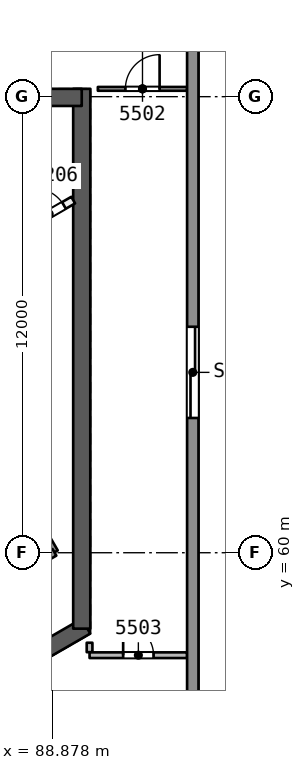
"""IFC4 building model, lengths in metres.
Left out: names, types, materials, properties, quantities, classifications, styles, units other than length and angle.
Written with IfcOpenShell. Run it as: python <this file> out.ifc"""

import sys

from ifc_helpers import new_model, si_unit, direction, frame, frame_2d, origin, place, context, subcontext, project, spatial, rectangle, extrude, element, fill, save


model = new_model("IFC4")
c1 = context("Model", 3, precision=1e-05, world=origin(), true_north=direction((0.0, 1.0)))
c2 = subcontext(c1, "Body", "Model", "MODEL_VIEW")
j1 = project(units=[si_unit("LENGTHUNIT", "METRE"), si_unit("PLANEANGLEUNIT", "RADIAN")], contexts=[c1])
p1 = place(None, origin())
s1 = spatial("IfcSite", under=j1, at=p1, CompositionType="ELEMENT")
p2 = place(p1, origin())
s2 = spatial("IfcBuilding", under=s1, at=p2, CompositionType="ELEMENT")
p3 = place(p2, frame((0.0, 0.0, 224.3)))
s3 = spatial("IfcBuildingStorey", under=s2, at=p3, CompositionType="ELEMENT", Elevation=224.3)
p4 = place(p3, frame((86.723, 56.31, 0.0), z_axis=(0.0, 0.0, 1.0), x_axis=(0.866042179588, 0.49997094233, 0.0)))
e1 = element("IfcWall", 1, at=p4, inside=s3, PredefinedType="SHEAR", context=c2, shape_type="SweptSolid", body=[
    extrude(rectangle(XDim=3.515, YDim=0.45, at=frame_2d((1.758, 0.0))), origin(), (0.0, 0.0, 1.0), 3.7),
])
p5 = place(p3, frame((89.655, 58.002, 0.0), z_axis=(0.0, 0.0, 1.0), x_axis=(0.0, 1.0, 0.0)))
e2 = element("IfcWall", 2, at=p5, inside=s3, PredefinedType="SHEAR", context=c2, shape_type="SweptSolid", body=[
    extrude(rectangle(XDim=14.204, YDim=0.45, at=frame_2d((7.102, 0.0))), origin(), (0.0, 0.0, 1.0), 3.7),
])
p6 = place(p3, frame((89.655, 71.981, 0.0), z_axis=(0.0, 0.0, 1.0), x_axis=(-1.0, 0.0, 0.0)))
e3 = element("IfcWall", 3, at=p6, inside=s3, PredefinedType="SHEAR", context=c2, shape_type="SweptSolid", body=[
    extrude(rectangle(XDim=10.155, YDim=0.45, at=frame_2d((5.078, 0.0))), origin(), (0.0, 0.0, 1.0), 3.7),
])
p7 = place(p6, frame((8.005, 0.0, 0.0)))
e4 = element("IfcOpeningElement", 4, at=p7, cuts=e3, PredefinedType="OPENING", context=c2, shape_type="SweptSolid", body=[
    extrude(rectangle(XDim=1.2, YDim=2.1, at=frame_2d((0.6, 1.05))), frame((0.0, 0.235, 0.0), z_axis=(0.0, -1.0, 0.0), x_axis=(1.0, 0.0, 0.0)), (0.0, 0.0, 1.0), 0.471),
])
p8 = place(p3, frame((90.079, 72.206, 0.0), z_axis=(0.0, 0.0, 1.0), x_axis=(1.0, 0.0, 0.0)))
e5 = element("IfcWall", 5, at=p8, inside=s3, PredefinedType="PARTITIONING", context=c2, shape_type="SweptSolid", body=[
    extrude(rectangle(XDim=2.349, YDim=0.1, at=frame_2d((1.175, 0.0))), origin(), (0.0, 0.0, 1.0), 3.3),
])
p9 = place(p8, frame((0.725, 0.0, 0.0)))
e6 = element("IfcOpeningElement", 6, at=p9, cuts=e5, PredefinedType="OPENING", context=c2, shape_type="SweptSolid", body=[
    extrude(rectangle(XDim=0.9, YDim=2.1, at=frame_2d((0.45, 1.05))), frame((0.0, 0.061, 0.0), z_axis=(0.0, -1.0, 0.0), x_axis=(1.0, 0.0, 0.0)), (0.0, 0.0, 1.0), 0.121),
])
p10 = place(p3, frame((89.861, 57.632, 0.0), z_axis=(0.0, 0.0, 1.0), x_axis=(0.0, -1.0, 0.0)))
e7 = element("IfcWall", 7, at=p10, inside=s3, PredefinedType="PARTITIONING", context=c2, shape_type="SweptSolid", body=[
    extrude(rectangle(XDim=0.248, YDim=0.15, at=frame_2d((0.124, 0.0))), origin(), (0.0, 0.0, 1.0), 3.3),
])
p11 = place(p3, frame((89.861, 57.304, 0.0), z_axis=(0.0, 0.0, 1.0), x_axis=(1.0, 0.0, 0.0)))
e8 = element("IfcWall", 8, at=p11, inside=s3, PredefinedType="PARTITIONING", context=c2, shape_type="SweptSolid", body=[
    extrude(rectangle(XDim=2.567, YDim=0.15, at=frame_2d((1.284, 0.0))), origin(), (0.0, 0.0, 1.0), 3.3),
])
p12 = place(p11, frame((0.884, 0.0, 0.0)))
e9 = element("IfcOpeningElement", 9, at=p12, cuts=e8, PredefinedType="OPENING", context=c2, shape_type="SweptSolid", body=[
    extrude(rectangle(XDim=0.8, YDim=2.1, at=frame_2d((0.4, 1.05))), frame((0.0, 0.085, 0.0), z_axis=(0.0, -1.0, 0.0), x_axis=(1.0, 0.0, 0.0)), (0.0, 0.0, 1.0), 0.171),
])
p13 = place(p3, frame((88.402, 56.789, 0.0), z_axis=(0.0, 0.0, 1.0), x_axis=(0.499966389646, -0.866044807862, 0.0)))
e10 = element("IfcWall", 10, at=p13, inside=s3, PredefinedType="PARTITIONING", context=c2, shape_type="SweptSolid", body=[
    extrude(rectangle(XDim=3.725, YDim=0.15, at=frame_2d((1.863, 0.0))), origin(), (0.0, 0.0, 1.0), 3.3),
])
p14 = place(p3, frame((92.577, 105.274, 0.0), z_axis=(0.0, 0.0, 1.0), x_axis=(0.0, -1.0, 0.0)))
e11 = element("IfcWall", 11, at=p14, inside=s3, PredefinedType="SOLIDWALL", context=c2, shape_type="SweptSolid", body=[
    extrude(rectangle(XDim=50.547, YDim=0.3, at=frame_2d((25.274, 0.0))), origin(), (0.0, 0.0, 1.0), 3.3),
])
p15 = place(p14, frame((29.218, 0.0, 0.0)))
e12 = element("IfcOpeningElement", 12, at=p15, cuts=e11, PredefinedType="OPENING", context=c2, shape_type="SweptSolid", body=[
    extrude(rectangle(XDim=2.4, YDim=2.4, at=frame_2d((1.2, 1.2))), frame((0.0, 0.161, 0.0), z_axis=(0.0, -1.0, 0.0), x_axis=(1.0, 0.0, 0.0)), (0.0, 0.0, 1.0), 0.321),
])
p16 = place(p14, frame((39.328, 0.0, 0.0)))
e13 = element("IfcOpeningElement", 13, at=p16, cuts=e11, PredefinedType="OPENING", context=c2, shape_type="SweptSolid", body=[
    extrude(rectangle(XDim=2.4, YDim=2.4, at=frame_2d((1.2, 1.2))), frame((0.0, 0.161, 0.0), z_axis=(0.0, -1.0, 0.0), x_axis=(1.0, 0.0, 0.0)), (0.0, 0.0, 1.0), 0.321),
])
p17 = place(p14, frame((18.774, 0.0, 0.0)))
e14 = element("IfcOpeningElement", 14, at=p17, cuts=e11, PredefinedType="OPENING", context=c2, shape_type="SweptSolid", body=[
    extrude(rectangle(XDim=2.4, YDim=2.4, at=frame_2d((1.2, 1.2))), frame((0.0, 0.161, 0.0), z_axis=(0.0, -1.0, 0.0), x_axis=(1.0, 0.0, 0.0)), (0.0, 0.0, 1.0), 0.321),
])
p18 = place(p14, frame((8.771, 0.0, 0.0)))
e15 = element("IfcOpeningElement", 15, at=p18, cuts=e11, PredefinedType="OPENING", context=c2, shape_type="SweptSolid", body=[
    extrude(rectangle(XDim=2.4, YDim=2.4, at=frame_2d((1.2, 1.2))), frame((0.0, 0.161, 0.0), z_axis=(0.0, -1.0, 0.0), x_axis=(1.0, 0.0, 0.0)), (0.0, 0.0, 1.0), 0.321),
])
p19 = place(p14, frame((23.918, 0.0, 0.0)))
e16 = element("IfcOpeningElement", 16, at=p19, cuts=e11, PredefinedType="OPENING", context=c2, shape_type="SweptSolid", body=[
    extrude(rectangle(XDim=2.4, YDim=2.4, at=frame_2d((1.2, 1.2))), frame((0.0, 0.161, 0.0), z_axis=(0.0, -1.0, 0.0), x_axis=(1.0, 0.0, 0.0)), (0.0, 0.0, 1.0), 0.321),
])
p20 = place(p3, frame((85.087, 66.679, 0.0), z_axis=(0.0, 0.0, 1.0), x_axis=(0.500019787375, -0.866013979237, 0.0)))
e17 = element("IfcWall", 17, at=p20, inside=s3, PredefinedType="SOLIDWALL", context=c2, shape_type="SweptSolid", body=[
    extrude(rectangle(XDim=7.7, YDim=0.2, at=frame_2d((3.85, 0.0))), origin(), (0.0, 0.0, 1.0), 3.3),
])
p21 = place(p20, frame((0.55, 0.0, 0.0)))
e18 = element("IfcOpeningElement", 18, at=p21, cuts=e17, PredefinedType="OPENING", context=c2, shape_type="SweptSolid", body=[
    extrude(rectangle(XDim=1.1, YDim=2.1, at=frame_2d((0.55, 1.05))), frame((0.0, 0.11, 0.0), z_axis=(0.0, -1.0, 0.0), x_axis=(1.0, 0.0, 0.0)), (0.0, 0.0, 1.0), 0.221),
])
p22 = place(p3, frame((88.165, 68.548, 0.0), z_axis=(0.0, 0.0, 1.0), x_axis=(0.866013036001, 0.500021421018, 0.0)))
e19 = element("IfcWall", 19, at=p22, inside=s3, PredefinedType="PARTITIONING", context=c2, shape_type="SweptSolid", body=[
    extrude(rectangle(XDim=1.461, YDim=0.2, at=frame_2d((0.73, 0.0))), origin(), (0.0, 0.0, 1.0), 3.3),
])
p23 = place(p22, frame((0.281, 0.0, 0.0)))
e20 = element("IfcOpeningElement", 20, at=p23, cuts=e19, PredefinedType="OPENING", context=c2, shape_type="SweptSolid", body=[
    extrude(rectangle(XDim=0.9, YDim=2.1, at=frame_2d((0.45, 1.05))), frame((0.0, 0.11, 0.0), z_axis=(0.0, -1.0, 0.0), x_axis=(1.0, 0.0, 0.0)), (0.0, 0.0, 1.0), 0.221),
])
p24 = place(p3, frame((85.343, 57.935, 0.0), z_axis=(0.0, 0.0, 1.0), x_axis=(0.866004344652, 0.500036473714, 0.0)))
e21 = element("IfcWall", 21, at=p24, inside=s3, PredefinedType="SOLIDWALL", context=c2, shape_type="SweptSolid", body=[
    extrude(rectangle(XDim=4.15, YDim=0.2, at=frame_2d((2.075, 0.0))), origin(), (0.0, 0.0, 1.0), 3.3),
])
p25 = place(p9, origin())
e22 = element("IfcDoor", 22, at=p25, inside=s3, OperationType="SINGLE_SWING_RIGHT", PredefinedType="NOTDEFINED", context=c2, shape_type="SweptSolid", body=[
    extrude(rectangle(XDim=0.9, YDim=2.1, at=frame_2d((0.45, 1.05))), frame((0.0, 0.025, 0.0), z_axis=(0.0, -1.0, 0.0), x_axis=(1.0, 0.0, 0.0)), (0.0, 0.0, 1.0), 0.05),
])
fill(e6, e22)
p26 = place(p12, origin())
e23 = element("IfcDoor", 23, at=p26, inside=s3, OperationType="SINGLE_SWING_LEFT", PredefinedType="NOTDEFINED", context=c2, shape_type="SweptSolid", body=[
    extrude(rectangle(XDim=0.8, YDim=2.1, at=frame_2d((0.4, 1.05))), frame((0.0, 0.025, 0.0), z_axis=(0.0, -1.0, 0.0), x_axis=(1.0, 0.0, 0.0)), (0.0, 0.0, 1.0), 0.05),
])
fill(e9, e23)
p27 = place(p16, origin())
e24 = element("IfcDoor", 24, at=p27, inside=s3, OperationType="SLIDING_TO_RIGHT", PredefinedType="NOTDEFINED", context=c2, shape_type="SweptSolid", body=[
    extrude(rectangle(XDim=2.4, YDim=2.4, at=frame_2d((1.2, 1.2))), frame((0.0, 0.025, 0.0), z_axis=(0.0, -1.0, 0.0), x_axis=(1.0, 0.0, 0.0)), (0.0, 0.0, 1.0), 0.05),
])
fill(e13, e24)
p28 = place(p23, origin())
e25 = element("IfcDoor", 25, at=p28, inside=s3, OperationType="SINGLE_SWING_LEFT", PredefinedType="NOTDEFINED", context=c2, shape_type="SweptSolid", body=[
    extrude(rectangle(XDim=0.9, YDim=2.1, at=frame_2d((0.45, 1.05))), frame((0.0, 0.025, 0.0), z_axis=(0.0, -1.0, 0.0), x_axis=(1.0, 0.0, 0.0)), (0.0, 0.0, 1.0), 0.05),
])
fill(e20, e25)
save(model, sys.argv[1])
